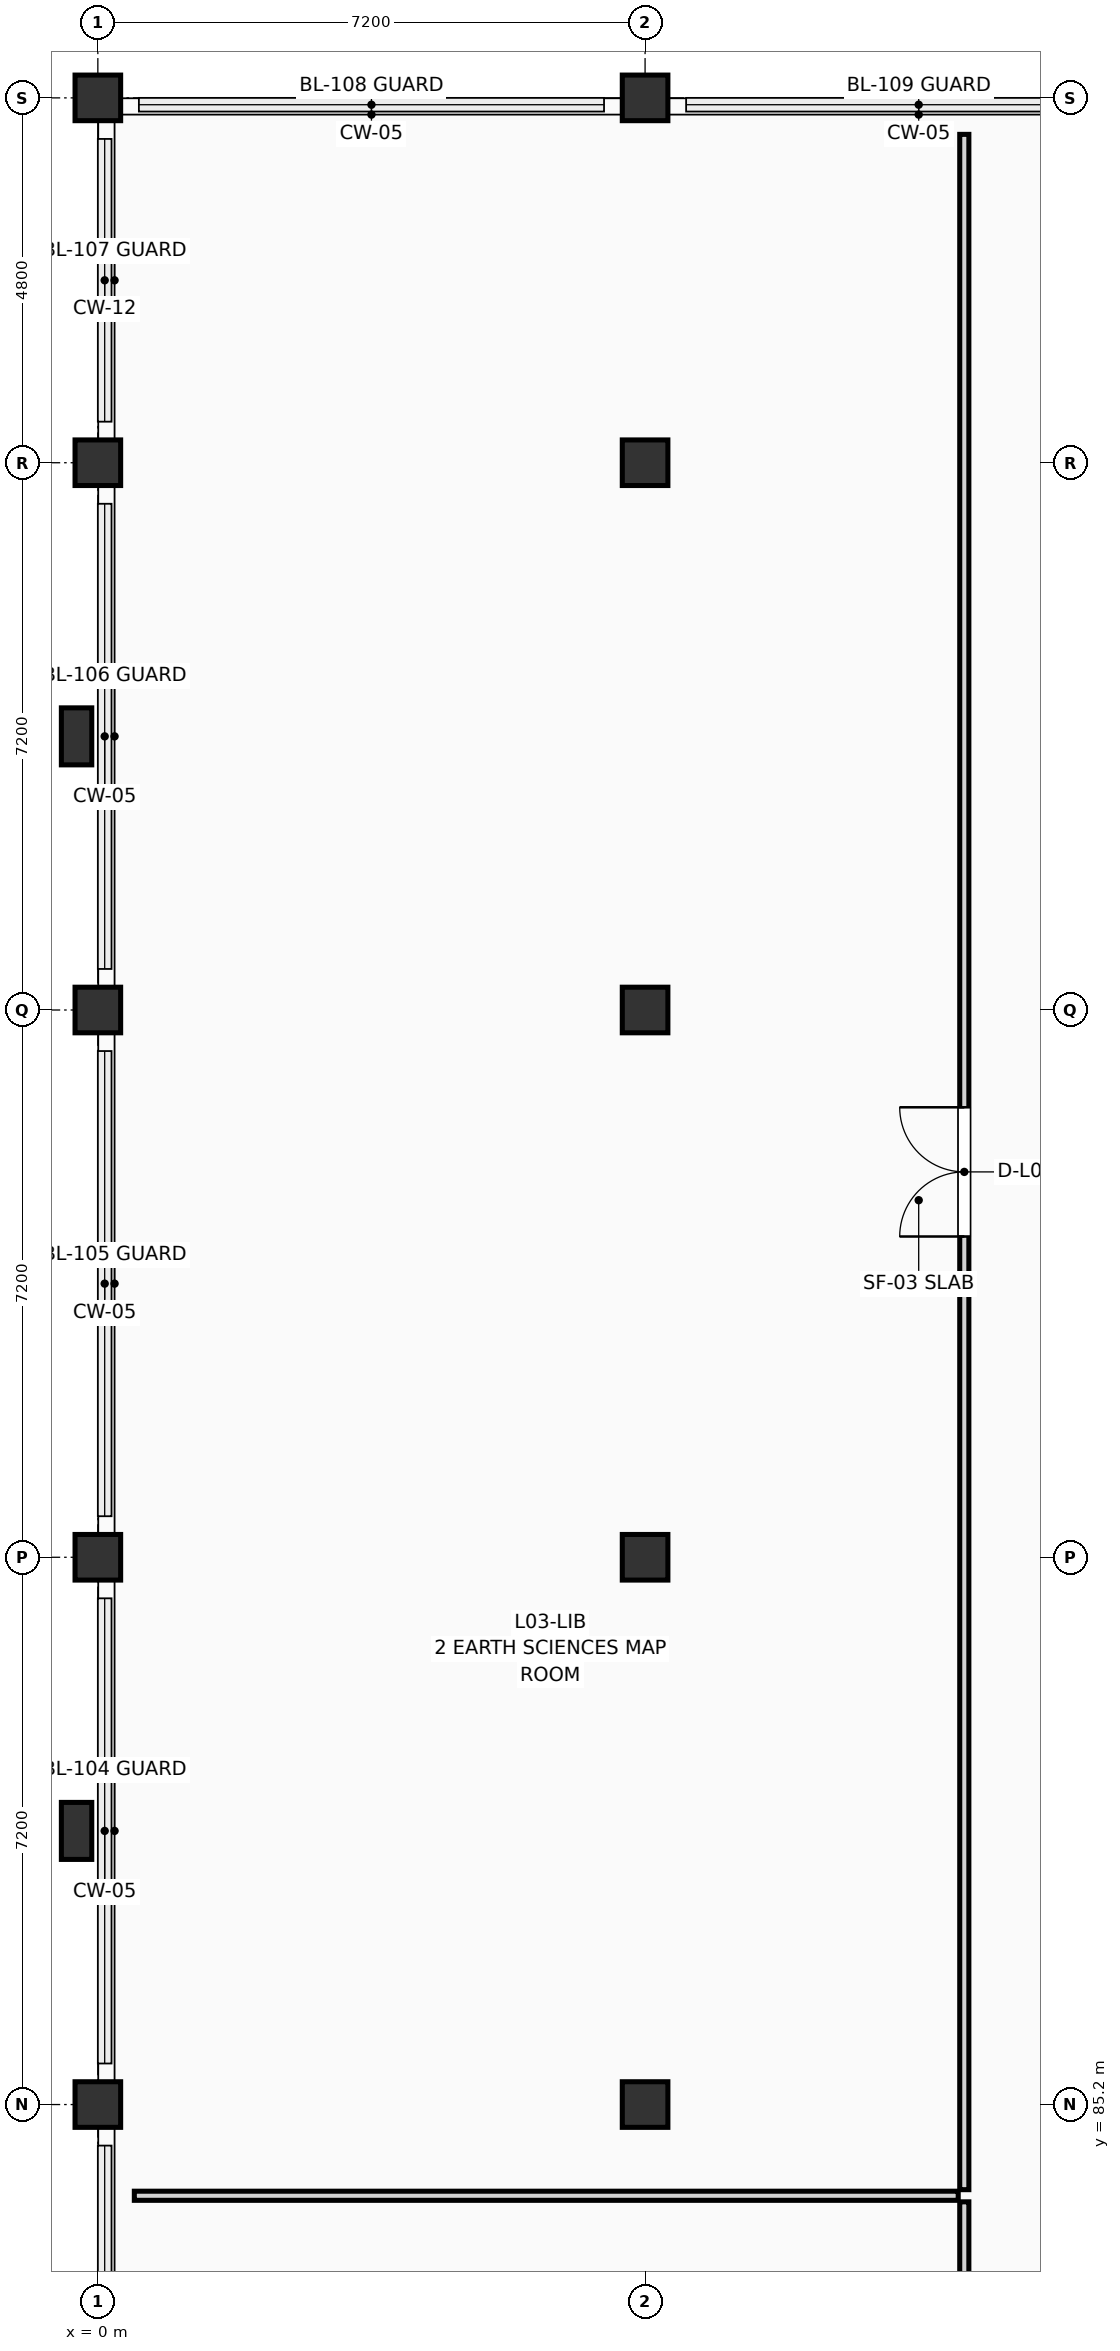
"""IFC4 building model, lengths in metres.
Left out: names, types, materials, properties, quantities, classifications, styles, units other than length and angle.
Written with IfcOpenShell. Run it as: python <this file> out.ifc"""

import sys

from ifc_helpers import new_model, si_unit, direction, frame, frame_2d, origin, origin_2d, place, context, subcontext, project, spatial, rectangle, extrude, element, fill, save


model = new_model("IFC4")
c1 = context("Model", 3, precision=1e-05, world=origin(), true_north=direction((0.0, 1.0)))
c2 = subcontext(c1, "Body", "Model", "MODEL_VIEW")
j1 = project(units=[si_unit("LENGTHUNIT", "METRE"), si_unit("PLANEANGLEUNIT", "RADIAN")], contexts=[c1])
p1 = place(None, origin())
s1 = spatial("IfcSite", under=j1, at=p1, CompositionType="ELEMENT")
p2 = place(p1, origin())
s2 = spatial("IfcBuilding", under=s1, at=p2, CompositionType="ELEMENT")
p3 = place(p2, frame((0.0, 0.0, 12.15)))
s3 = spatial("IfcBuildingStorey", under=s2, at=p3, CompositionType="ELEMENT", Elevation=12.15)
for number, where, z_axis, x_axis in (
    (1, (0.0, 85.2, 0.0), (0.0, 0.0, 1.0), (1.0, 0.0, 0.0)),
    (2, (0.0, 92.4, 0.0), (0.0, 0.0, 1.0), (1.0, 0.0, 0.0)),
    (3, (0.0, 99.6, 0.0), (0.0, 0.0, 1.0), (1.0, 0.0, 0.0)),
    (4, (0.0, 106.8, 0.0), (0.0, 0.0, 1.0), (1.0, 0.0, 0.0)),
    (5, (0.0, 111.6, 0.0), (0.0, 0.0, 1.0), (1.0, 0.0, 0.0)),
    (6, (7.2, 85.2, 0.0), (0.0, 0.0, 1.0), (1.0, 0.0, 0.0)),
    (7, (7.2, 92.4, 0.0), (0.0, 0.0, 1.0), (1.0, 0.0, 0.0)),
    (8, (7.2, 99.6, 0.0), (0.0, 0.0, 1.0), (1.0, 0.0, 0.0)),
    (9, (7.2, 106.8, 0.0), (0.0, 0.0, 1.0), (1.0, 0.0, 0.0)),
    (10, (7.2, 111.6, 0.0), (0.0, 0.0, 1.0), (1.0, 0.0, 0.0)),
):
    element("IfcColumn", number, at=place(p3, frame(where, z_axis=z_axis, x_axis=x_axis)), inside=s3, PredefinedType="COLUMN", context=c2, shape_type="SweptSolid", body=[
        extrude(rectangle(XDim=0.6, YDim=0.6, at=origin_2d()), origin(), (0.0, 0.0, 1.0), 3.6),
    ])
for number, where, z_axis, x_axis in (
    (11, (-0.28, 88.8, 0.0), (0.0, 0.0, 1.0), (1.0, 0.0, 0.0)),
    (12, (-0.28, 103.2, 0.0), (0.0, 0.0, 1.0), (1.0, 0.0, 0.0)),
):
    element("IfcColumn", number, at=place(p3, frame(where, z_axis=z_axis, x_axis=x_axis)), inside=s3, PredefinedType="PILASTER", context=c2, shape_type="SweptSolid", body=[
        extrude(rectangle(XDim=0.4, YDim=0.75, at=origin_2d()), origin(), (0.0, 0.0, 1.0), 3.6),
    ])
p4 = place(p3, frame((11.4, 56.68, 0.0), z_axis=(0.0, 0.0, 1.0), x_axis=(0.0, 1.0, 0.0)))
e13 = element("IfcWall", 13, at=p4, inside=s3, PredefinedType="PARTITIONING", context=c2, shape_type="SweptSolid", body=[
    extrude(rectangle(XDim=27.24, YDim=0.12, at=frame_2d((13.62, 0.0))), origin(), (0.0, 0.0, 1.0), 3.375),
])
p5 = place(p4, frame((12.77, 0.0, 0.0)))
e14 = element("IfcOpeningElement", 14, at=p5, cuts=e13, PredefinedType="OPENING", context=c2, shape_type="SweptSolid", body=[
    extrude(rectangle(XDim=1.7, YDim=2.28, at=frame_2d((0.85, 1.14))), frame((0.0, 0.072, 0.0), z_axis=(0.0, -1.0, 0.0), x_axis=(1.0, 0.0, 0.0)), (0.0, 0.0, 1.0), 0.144),
])
p6 = place(p3, frame((0.48, 84.0, 0.0), z_axis=(0.0, 0.0, 1.0), x_axis=(1.0, 0.0, 0.0)))
e15 = element("IfcWall", 15, at=p6, inside=s3, PredefinedType="PARTITIONING", context=c2, shape_type="SweptSolid", body=[
    extrude(rectangle(XDim=10.84, YDim=0.12, at=frame_2d((5.42, 0.0))), origin(), (0.0, 0.0, 1.0), 3.375),
])
p7 = place(p3, frame((11.4, 84.08, 0.0), z_axis=(0.0, 0.0, 1.0), x_axis=(0.0, 1.0, 0.0)))
e16 = element("IfcWall", 16, at=p7, inside=s3, PredefinedType="PARTITIONING", context=c2, shape_type="SweptSolid", body=[
    extrude(rectangle(XDim=27.04, YDim=0.12, at=frame_2d((13.52, 0.0))), origin(), (0.0, 0.0, 1.0), 3.375),
])
p8 = place(p7, frame((12.54, 0.0, 0.0)))
e17 = element("IfcOpeningElement", 17, at=p8, cuts=e16, PredefinedType="OPENING", context=c2, shape_type="SweptSolid", body=[
    extrude(rectangle(XDim=1.7, YDim=2.28, at=frame_2d((0.85, 1.14))), frame((0.0, 0.072, 0.0), z_axis=(0.0, -1.0, 0.0), x_axis=(1.0, 0.0, 0.0)), (0.0, 0.0, 1.0), 0.144),
])
p9 = place(p8, origin())
e18 = element("IfcDoor", 18, at=p9, inside=s3, OperationType="DOUBLE_DOOR_SINGLE_SWING", PredefinedType="DOOR", context=c2, shape_type="SweptSolid", body=[
    extrude(rectangle(XDim=1.7, YDim=2.28, at=frame_2d((0.85, 1.14))), frame((0.0, 0.025, 0.0), z_axis=(0.0, -1.0, 0.0), x_axis=(1.0, 0.0, 0.0)), (0.0, 0.0, 1.0), 0.05),
])
fill(e17, e18)
save(model, sys.argv[1])
